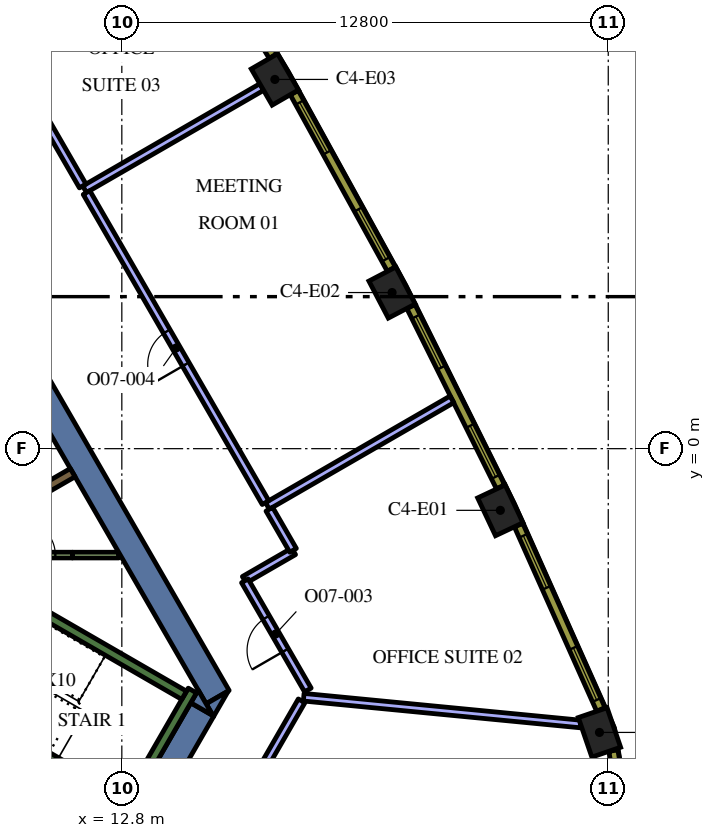
"""IFC4 building model, lengths in metres.
Left out: names, types, materials, properties, quantities, classifications, styles, units other than length and angle.
Written with IfcOpenShell. Run it as: python <this file> out.ifc"""

import sys

from ifc_helpers import new_model, si_unit, direction, frame, frame_2d, origin, origin_2d, place, context, subcontext, project, spatial, polyline, rectangle, outline, extrude, element, fill, save


model = new_model("IFC4")
c1 = context("Model", 3, precision=1e-05, world=origin(), true_north=direction((0.0, 1.0)))
c2 = subcontext(c1, "Body", "Model", "MODEL_VIEW")
j1 = project(units=[si_unit("LENGTHUNIT", "METRE"), si_unit("PLANEANGLEUNIT", "RADIAN")], contexts=[c1])
p1 = place(None, origin())
s1 = spatial("IfcSite", under=j1, at=p1, CompositionType="ELEMENT")
p2 = place(p1, origin())
s2 = spatial("IfcBuilding", under=s1, at=p2, CompositionType="ELEMENT")
p3 = place(p2, frame((0.0, 0.0, 214.2)))
s3 = spatial("IfcBuildingStorey", under=s2, at=p3, CompositionType="ELEMENT", Elevation=214.2)
for number, where, z_axis, x_axis in (
    (1, (25.369, -7.466, 0.0), (0.0, 0.0, 1.0), (-0.324, 0.946, 0.0)),
    (2, (22.76, -1.623, 0.0), (0.0, 0.0, 1.0), (-0.426, 0.905, 0.0)),
    (3, (19.912, 4.108, 0.0), (0.0, 0.0, 1.0), (-0.464, 0.886, 0.0)),
    (4, (16.827, 9.715, 0.0), (0.0, 0.0, 1.0), (-0.5, 0.866, 0.0)),
):
    element("IfcColumn", number, at=place(p3, frame(where, z_axis=z_axis, x_axis=x_axis)), inside=s3, PredefinedType="COLUMN", context=c2, shape_type="SweptSolid", body=[
        extrude(rectangle(XDim=1.1, YDim=0.8, at=origin_2d()), origin(), (0.0, 0.0, 1.0), 4.2),
    ])
p4 = place(p3, frame((9.085, 4.264, 0.0), z_axis=(0.0, 0.0, 1.0), x_axis=(0.499998082512, -0.866026510844, 0.0)))
e5 = element("IfcWall", 5, at=p4, inside=s3, PredefinedType="SOLIDWALL", context=c2, shape_type="SweptSolid", body=[
    extrude(rectangle(XDim=12.472, YDim=0.7, at=frame_2d((6.236, 0.0))), origin(), (0.0, 0.0, 1.0), 4.2),
])
p5 = place(p3, origin())
e6 = element("IfcWall", 6, at=p5, inside=s3, PredefinedType="SOLIDWALL", context=c2, shape_type="SweptSolid", body=[
    extrude(outline(polyline([(15.213, -7.05), (15.019, -6.714), (15.601, -6.378), (15.213, -7.05)])), origin(), (0.0, 0.0, 1.0), 4.2),
])
p6 = place(p3, frame((13.003, -10.179, 0.0), z_axis=(0.0, 0.0, 1.0), x_axis=(0.499972675833, 0.866041178825, 0.0)))
e7 = element("IfcWall", 7, at=p6, inside=s3, PredefinedType="SOLIDWALL", context=c2, shape_type="SweptSolid", body=[
    extrude(rectangle(XDim=3.829, YDim=0.7, at=frame_2d((1.915, 0.0))), origin(), (0.0, 0.0, 1.0), 4.2),
])
e8 = element("IfcWall", 8, at=p5, inside=s3, PredefinedType="SOLIDWALL", context=c2, shape_type="SweptSolid", body=[
    extrude(outline(polyline([(14.809, -6.35), (15.197, -7.022), (14.615, -6.686), (14.809, -6.35)])), origin(), (0.0, 0.0, 1.0), 4.2),
])
p7 = place(p3, frame((12.84, -9.511, 0.0), z_axis=(0.0, 0.0, 1.0), x_axis=(0.500048121057, 0.865997619297, 0.0)))
e9 = element("IfcWall", 9, at=p7, inside=s3, PredefinedType="SOLIDWALL", context=c2, shape_type="SweptSolid", body=[
    extrude(rectangle(XDim=3.634, YDim=0.25, at=frame_2d((1.817, 0.0))), origin(), (0.0, 0.0, 1.0), 4.2),
])
p8 = place(p3, frame((12.84, -9.261, 0.0), z_axis=(0.0, 0.0, 1.0), x_axis=(-0.866013990052, 0.500019768644, 0.0)))
e10 = element("IfcWall", 10, at=p8, inside=s3, PredefinedType="SOLIDWALL", context=c2, shape_type="SweptSolid", body=[
    extrude(rectangle(XDim=6.8, YDim=0.25, at=frame_2d((3.4, 0.0))), origin(), (0.0, 0.0, 1.0), 4.2),
])
p9 = place(p3, frame((8.334, -2.964, 0.0), z_axis=(0.0, 0.0, 1.0), x_axis=(0.866016039709, -0.500016218704, 0.0)))
e11 = element("IfcWall", 11, at=p9, inside=s3, PredefinedType="SOLIDWALL", context=c2, shape_type="SweptSolid", body=[
    extrude(rectangle(XDim=7.05, YDim=0.25, at=frame_2d((3.525, 0.0))), origin(), (0.0, 0.0, 1.0), 4.2),
])
p10 = place(p3, frame((11.507, -0.631, 0.0), z_axis=(0.0, 0.0, 1.0), x_axis=(-0.866011447264, -0.500024172624, 0.0)))
e12 = element("IfcWall", 12, at=p10, inside=s3, PredefinedType="SOLIDWALL", context=c2, shape_type="SweptSolid", body=[
    extrude(rectangle(XDim=5.65, YDim=0.25, at=frame_2d((2.825, 0.0))), origin(), (0.0, 0.0, 1.0), 4.2),
])
p11 = place(p3, frame((11.5, -2.801, 0.0), z_axis=(0.0, 0.0, 1.0), x_axis=(1.0, 0.0, 0.0)))
e13 = element("IfcWall", 13, at=p11, inside=s3, PredefinedType="PARTITIONING", context=c2, shape_type="SweptSolid", body=[
    extrude(rectangle(XDim=1.222, YDim=0.15, at=frame_2d((0.611, 0.0))), origin(), (0.0, 0.0, 1.0), 3.45),
])
p12 = place(p3, frame((9.7, -2.8, 0.0), z_axis=(0.0, 0.0, 1.0), x_axis=(1.0, 0.0, 0.0)))
e14 = element("IfcWall", 14, at=p12, inside=s3, PredefinedType="PARTITIONING", context=c2, shape_type="SweptSolid", body=[
    extrude(rectangle(XDim=1.8, YDim=0.15, at=frame_2d((0.9, 0.0))), origin(), (0.0, 0.0, 1.0), 3.45),
])
p13 = place(p12, frame((0.45, 0.0, 0.0)))
e15 = element("IfcOpeningElement", 15, at=p13, cuts=e14, PredefinedType="OPENING", context=c2, shape_type="SweptSolid", body=[
    extrude(rectangle(XDim=0.9, YDim=2.1, at=frame_2d((0.45, 1.05))), frame((0.0, 0.085, 0.0), z_axis=(0.0, -1.0, 0.0), x_axis=(1.0, 0.0, 0.0)), (0.0, 0.0, 1.0), 0.17),
])
p14 = place(p3, frame((17.586, -6.54, 0.0), z_axis=(0.0, 0.0, 1.0), x_axis=(0.995357542522, -0.096246363795, 0.0)))
e16 = element("IfcWall", 16, at=p14, inside=s3, PredefinedType="PARTITIONING", context=c2, shape_type="SweptSolid", body=[
    extrude(rectangle(XDim=7.318, YDim=0.2, at=frame_2d((3.659, 0.0))), origin(), (0.0, 0.0, 1.0), 3.45),
])
p15 = place(p3, frame((14.362, -12.124, 0.0), z_axis=(0.0, 0.0, 1.0), x_axis=(0.500017005442, 0.866015585465, 0.0)))
e17 = element("IfcWall", 17, at=p15, inside=s3, PredefinedType="PARTITIONING", context=c2, shape_type="SweptSolid", body=[
    extrude(rectangle(XDim=6.338, YDim=0.2, at=frame_2d((3.169, 0.0))), origin(), (0.0, 0.0, 1.0), 3.45),
])
p16 = place(p3, frame((16.631, -1.506, 0.0), z_axis=(0.0, 0.0, 1.0), x_axis=(0.866045655253, 0.499964921787, 0.0)))
e18 = element("IfcWall", 18, at=p16, inside=s3, PredefinedType="PARTITIONING", context=c2, shape_type="SweptSolid", body=[
    extrude(rectangle(XDim=5.607, YDim=0.2, at=frame_2d((2.804, 0.0))), origin(), (0.0, 0.0, 1.0), 3.45),
])
p17 = place(p3, frame((16.022, -3.451, 0.0), z_axis=(0.0, 0.0, 1.0), x_axis=(0.866031096941, 0.499990139034, 0.0)))
e19 = element("IfcWall", 19, at=p17, inside=s3, PredefinedType="PARTITIONING", context=c2, shape_type="SweptSolid", body=[
    extrude(rectangle(XDim=1.5, YDim=0.2, at=frame_2d((0.75, 0.0))), origin(), (0.0, 0.0, 1.0), 3.45),
])
p18 = place(p3, frame((17.306, -2.675, 0.0), z_axis=(0.0, 0.0, 1.0), x_axis=(-0.499919672301, 0.866071776036, 0.0)))
e20 = element("IfcWall", 20, at=p18, inside=s3, PredefinedType="PARTITIONING", context=c2, shape_type="SweptSolid", body=[
    extrude(rectangle(XDim=1.25, YDim=0.2, at=frame_2d((0.625, 0.0))), origin(), (0.0, 0.0, 1.0), 3.45),
])
p19 = place(p3, frame((17.696, -6.35, 0.0), z_axis=(0.0, 0.0, 1.0), x_axis=(-0.500017629075, 0.866015225394, 0.0)))
e21 = element("IfcWall", 21, at=p19, inside=s3, PredefinedType="PARTITIONING", context=c2, shape_type="SweptSolid", body=[
    extrude(rectangle(XDim=3.317, YDim=0.2, at=frame_2d((1.659, 0.0))), origin(), (0.0, 0.0, 1.0), 3.45),
])
p20 = place(p19, frame((1.2, 0.0, 0.0)))
e22 = element("IfcOpeningElement", 22, at=p20, cuts=e21, PredefinedType="OPENING", context=c2, shape_type="SweptSolid", body=[
    extrude(rectangle(XDim=1.0, YDim=2.1, at=frame_2d((0.5, 1.05))), frame((0.0, 0.11, 0.0), z_axis=(0.0, -1.0, 0.0), x_axis=(1.0, 0.0, 0.0)), (0.0, 0.0, 1.0), 0.22),
])
p21 = place(p3, frame((11.821, 6.825, 0.0), z_axis=(0.0, 0.0, 1.0), x_axis=(0.866011792348, 0.500023574959, 0.0)))
e23 = element("IfcWall", 23, at=p21, inside=s3, PredefinedType="PARTITIONING", context=c2, shape_type="SweptSolid", body=[
    extrude(rectangle(XDim=5.381, YDim=0.2, at=frame_2d((2.69, 0.0))), origin(), (0.0, 0.0, 1.0), 3.45),
])
p22 = place(p3, frame((16.581, -1.419, 0.0), z_axis=(0.0, 0.0, 1.0), x_axis=(-0.500019350398, 0.866014231539, 0.0)))
e24 = element("IfcWall", 24, at=p22, inside=s3, PredefinedType="PARTITIONING", context=c2, shape_type="SweptSolid", body=[
    extrude(rectangle(XDim=9.42, YDim=0.2, at=frame_2d((4.71, 0.0))), origin(), (0.0, 0.0, 1.0), 3.45),
])
p23 = place(p22, frame((4.2, 0.0, 0.0)))
e25 = element("IfcOpeningElement", 25, at=p23, cuts=e24, PredefinedType="OPENING", context=c2, shape_type="SweptSolid", body=[
    extrude(rectangle(XDim=1.0, YDim=2.1, at=frame_2d((0.5, 1.05))), frame((0.0, 0.11, 0.0), z_axis=(0.0, -1.0, 0.0), x_axis=(1.0, 0.0, 0.0)), (0.0, 0.0, 1.0), 0.22),
])
p24 = place(p3, frame((11.771, 6.912, 0.0), z_axis=(0.0, 0.0, 1.0), x_axis=(-0.500008127286, 0.866020711443, 0.0)))
e26 = element("IfcWall", 26, at=p24, inside=s3, PredefinedType="PARTITIONING", context=c2, shape_type="SweptSolid", body=[
    extrude(rectangle(XDim=9.42, YDim=0.2, at=frame_2d((4.71, 0.0))), origin(), (0.0, 0.0, 1.0), 3.45),
])
p25 = place(p24, frame((4.2, 0.0, 0.0)))
e27 = element("IfcOpeningElement", 27, at=p25, cuts=e26, PredefinedType="OPENING", context=c2, shape_type="SweptSolid", body=[
    extrude(rectangle(XDim=1.0, YDim=2.1, at=frame_2d((0.5, 1.05))), frame((0.0, 0.11, 0.0), z_axis=(0.0, -1.0, 0.0), x_axis=(1.0, 0.0, 0.0)), (0.0, 0.0, 1.0), 0.22),
])
p26 = place(p3, frame((26.172, -10.517, 0.0), z_axis=(0.0, 0.0, 1.0), x_axis=(-0.167660055546, 0.985844869021, 0.0)))
e28 = element("IfcWall", 28, at=p26, inside=s3, PredefinedType="SOLIDWALL", context=c2, shape_type="SweptSolid", body=[
    extrude(rectangle(XDim=2.609, YDim=0.24, at=frame_2d((1.305, 0.0))), origin(), (0.0, 0.0, 1.0), 3.95),
])
p27 = place(p26, frame((0.805, 0.0, 0.9)))
e29 = element("IfcOpeningElement", 29, at=p27, cuts=e28, PredefinedType="OPENING", context=c2, shape_type="SweptSolid", body=[
    extrude(rectangle(XDim=1.0, YDim=2.55, at=frame_2d((0.5, 1.275))), frame((0.0, 0.13, 0.0), z_axis=(0.0, -1.0, 0.0), x_axis=(1.0, 0.0, 0.0)), (0.0, 0.0, 1.0), 0.26),
])
p28 = place(p3, frame((25.405, -6.861, 0.0), z_axis=(0.0, 0.0, 1.0), x_axis=(-0.407579651789, 0.913169659728, 0.0)))
e30 = element("IfcWall", 30, at=p28, inside=s3, PredefinedType="SOLIDWALL", context=c2, shape_type="SweptSolid", body=[
    extrude(rectangle(XDim=5.311, YDim=0.24, at=frame_2d((2.655, 0.0))), origin(), (0.0, 0.0, 1.0), 3.95),
])
p29 = place(p28, frame((0.271, 0.0, 0.9)))
e31 = element("IfcOpeningElement", 31, at=p29, cuts=e30, PredefinedType="OPENING", context=c2, shape_type="SweptSolid", body=[
    extrude(rectangle(XDim=1.5, YDim=2.55, at=frame_2d((0.75, 1.275))), frame((0.0, 0.13, 0.0), z_axis=(0.0, -1.0, 0.0), x_axis=(1.0, 0.0, 0.0)), (0.0, 0.0, 1.0), 0.26),
])
p30 = place(p28, frame((3.504, 0.0, 0.9)))
e32 = element("IfcOpeningElement", 32, at=p30, cuts=e30, PredefinedType="OPENING", context=c2, shape_type="SweptSolid", body=[
    extrude(rectangle(XDim=1.5, YDim=2.55, at=frame_2d((0.75, 1.275))), frame((0.0, 0.13, 0.0), z_axis=(0.0, -1.0, 0.0), x_axis=(1.0, 0.0, 0.0)), (0.0, 0.0, 1.0), 0.26),
])
p31 = place(p3, frame((22.766, -1.005, 0.0), z_axis=(0.0, 0.0, 1.0), x_axis=(-0.445129582031, 0.895466166419, 0.0)))
e33 = element("IfcWall", 33, at=p31, inside=s3, PredefinedType="SOLIDWALL", context=c2, shape_type="SweptSolid", body=[
    extrude(rectangle(XDim=5.298, YDim=0.24, at=frame_2d((2.649, 0.0))), origin(), (0.0, 0.0, 1.0), 3.95),
])
p32 = place(p31, frame((0.295, 0.0, 0.9)))
e34 = element("IfcOpeningElement", 34, at=p32, cuts=e33, PredefinedType="OPENING", context=c2, shape_type="SweptSolid", body=[
    extrude(rectangle(XDim=1.5, YDim=2.55, at=frame_2d((0.75, 1.275))), frame((0.0, 0.13, 0.0), z_axis=(0.0, -1.0, 0.0), x_axis=(1.0, 0.0, 0.0)), (0.0, 0.0, 1.0), 0.26),
])
p33 = place(p31, frame((3.504, 0.0, 0.9)))
e35 = element("IfcOpeningElement", 35, at=p33, cuts=e33, PredefinedType="OPENING", context=c2, shape_type="SweptSolid", body=[
    extrude(rectangle(XDim=1.5, YDim=2.55, at=frame_2d((0.75, 1.275))), frame((0.0, 0.13, 0.0), z_axis=(0.0, -1.0, 0.0), x_axis=(1.0, 0.0, 0.0)), (0.0, 0.0, 1.0), 0.26),
])
p34 = place(p3, frame((19.892, 4.725, 0.0), z_axis=(0.0, 0.0, 1.0), x_axis=(-0.481925825015, 0.876212017256, 0.0)))
e36 = element("IfcWall", 36, at=p34, inside=s3, PredefinedType="SOLIDWALL", context=c2, shape_type="SweptSolid", body=[
    extrude(rectangle(XDim=5.299, YDim=0.24, at=frame_2d((2.649, 0.0))), origin(), (0.0, 0.0, 1.0), 3.95),
])
p35 = place(p34, frame((0.295, 0.0, 0.9)))
e37 = element("IfcOpeningElement", 37, at=p35, cuts=e36, PredefinedType="OPENING", context=c2, shape_type="SweptSolid", body=[
    extrude(rectangle(XDim=1.5, YDim=2.55, at=frame_2d((0.75, 1.275))), frame((0.0, 0.13, 0.0), z_axis=(0.0, -1.0, 0.0), x_axis=(1.0, 0.0, 0.0)), (0.0, 0.0, 1.0), 0.26),
])
p36 = place(p34, frame((3.504, 0.0, 0.9)))
e38 = element("IfcOpeningElement", 38, at=p36, cuts=e36, PredefinedType="OPENING", context=c2, shape_type="SweptSolid", body=[
    extrude(rectangle(XDim=1.5, YDim=2.55, at=frame_2d((0.75, 1.275))), frame((0.0, 0.13, 0.0), z_axis=(0.0, -1.0, 0.0), x_axis=(1.0, 0.0, 0.0)), (0.0, 0.0, 1.0), 0.26),
])
p37 = place(p3, frame((16.782, 10.331, 0.0), z_axis=(0.0, 0.0, 1.0), x_axis=(-0.517846166225, 0.855473756538, 0.0)))
e39 = element("IfcWall", 39, at=p37, inside=s3, PredefinedType="SOLIDWALL", context=c2, shape_type="SweptSolid", body=[
    extrude(rectangle(XDim=5.298, YDim=0.24, at=frame_2d((2.649, 0.0))), origin(), (0.0, 0.0, 1.0), 3.95),
])
p38 = place(p37, frame((0.294, 0.0, 0.9)))
e40 = element("IfcOpeningElement", 40, at=p38, cuts=e39, PredefinedType="OPENING", context=c2, shape_type="SweptSolid", body=[
    extrude(rectangle(XDim=1.5, YDim=2.55, at=frame_2d((0.75, 1.275))), frame((0.0, 0.13, 0.0), z_axis=(0.0, -1.0, 0.0), x_axis=(1.0, 0.0, 0.0)), (0.0, 0.0, 1.0), 0.26),
])
p39 = place(p37, frame((3.504, 0.0, 0.9)))
e41 = element("IfcOpeningElement", 41, at=p39, cuts=e39, PredefinedType="OPENING", context=c2, shape_type="SweptSolid", body=[
    extrude(rectangle(XDim=1.5, YDim=2.55, at=frame_2d((0.75, 1.275))), frame((0.0, 0.13, 0.0), z_axis=(0.0, -1.0, 0.0), x_axis=(1.0, 0.0, 0.0)), (0.0, 0.0, 1.0), 0.26),
])
p40 = place(p13, origin())
e42 = element("IfcDoor", 42, at=p40, inside=s3, OperationType="SINGLE_SWING_LEFT", PredefinedType="DOOR", context=c2, shape_type="SweptSolid", body=[
    extrude(rectangle(XDim=0.9, YDim=2.1, at=frame_2d((0.45, 1.05))), frame((0.0, 0.025, 0.0), z_axis=(0.0, -1.0, 0.0), x_axis=(1.0, 0.0, 0.0)), (0.0, 0.0, 1.0), 0.05),
])
fill(e15, e42)
p41 = place(p20, origin())
e43 = element("IfcDoor", 43, at=p41, inside=s3, OperationType="SINGLE_SWING_RIGHT", PredefinedType="DOOR", context=c2, shape_type="SweptSolid", body=[
    extrude(rectangle(XDim=1.0, YDim=2.1, at=frame_2d((0.5, 1.05))), frame((0.0, 0.025, 0.0), z_axis=(0.0, -1.0, 0.0), x_axis=(1.0, 0.0, 0.0)), (0.0, 0.0, 1.0), 0.05),
])
fill(e22, e43)
p42 = place(p23, origin())
e44 = element("IfcDoor", 44, at=p42, inside=s3, OperationType="SINGLE_SWING_LEFT", PredefinedType="DOOR", context=c2, shape_type="SweptSolid", body=[
    extrude(rectangle(XDim=1.0, YDim=2.1, at=frame_2d((0.5, 1.05))), frame((0.0, 0.025, 0.0), z_axis=(0.0, -1.0, 0.0), x_axis=(1.0, 0.0, 0.0)), (0.0, 0.0, 1.0), 0.05),
])
fill(e25, e44)
p43 = place(p29, origin())
e45 = element("IfcWindow", 45, at=p43, inside=s3, PartitioningType="SINGLE_PANEL", PredefinedType="WINDOW", context=c2, shape_type="SweptSolid", body=[
    extrude(rectangle(XDim=1.5, YDim=2.55, at=frame_2d((0.75, 1.275))), frame((0.0, 0.04, 0.0), z_axis=(0.0, -1.0, 0.0), x_axis=(1.0, 0.0, 0.0)), (0.0, 0.0, 1.0), 0.06),
])
fill(e31, e45)
p44 = place(p30, origin())
e46 = element("IfcWindow", 46, at=p44, inside=s3, PartitioningType="SINGLE_PANEL", PredefinedType="WINDOW", context=c2, shape_type="SweptSolid", body=[
    extrude(rectangle(XDim=1.5, YDim=2.55, at=frame_2d((0.75, 1.275))), frame((0.0, 0.04, 0.0), z_axis=(0.0, -1.0, 0.0), x_axis=(1.0, 0.0, 0.0)), (0.0, 0.0, 1.0), 0.06),
])
fill(e32, e46)
p45 = place(p32, origin())
e47 = element("IfcWindow", 47, at=p45, inside=s3, PartitioningType="SINGLE_PANEL", PredefinedType="WINDOW", context=c2, shape_type="SweptSolid", body=[
    extrude(rectangle(XDim=1.5, YDim=2.55, at=frame_2d((0.75, 1.275))), frame((0.0, 0.04, 0.0), z_axis=(0.0, -1.0, 0.0), x_axis=(1.0, 0.0, 0.0)), (0.0, 0.0, 1.0), 0.06),
])
fill(e34, e47)
p46 = place(p33, origin())
e48 = element("IfcWindow", 48, at=p46, inside=s3, PartitioningType="SINGLE_PANEL", PredefinedType="WINDOW", context=c2, shape_type="SweptSolid", body=[
    extrude(rectangle(XDim=1.5, YDim=2.55, at=frame_2d((0.75, 1.275))), frame((0.0, 0.04, 0.0), z_axis=(0.0, -1.0, 0.0), x_axis=(1.0, 0.0, 0.0)), (0.0, 0.0, 1.0), 0.06),
])
fill(e35, e48)
p47 = place(p35, origin())
e49 = element("IfcWindow", 49, at=p47, inside=s3, PartitioningType="SINGLE_PANEL", PredefinedType="WINDOW", context=c2, shape_type="SweptSolid", body=[
    extrude(rectangle(XDim=1.5, YDim=2.55, at=frame_2d((0.75, 1.275))), frame((0.0, 0.04, 0.0), z_axis=(0.0, -1.0, 0.0), x_axis=(1.0, 0.0, 0.0)), (0.0, 0.0, 1.0), 0.06),
])
fill(e37, e49)
p48 = place(p36, origin())
e50 = element("IfcWindow", 50, at=p48, inside=s3, PartitioningType="SINGLE_PANEL", PredefinedType="WINDOW", context=c2, shape_type="SweptSolid", body=[
    extrude(rectangle(XDim=1.5, YDim=2.55, at=frame_2d((0.75, 1.275))), frame((0.0, 0.04, 0.0), z_axis=(0.0, -1.0, 0.0), x_axis=(1.0, 0.0, 0.0)), (0.0, 0.0, 1.0), 0.06),
])
fill(e38, e50)
save(model, sys.argv[1])
